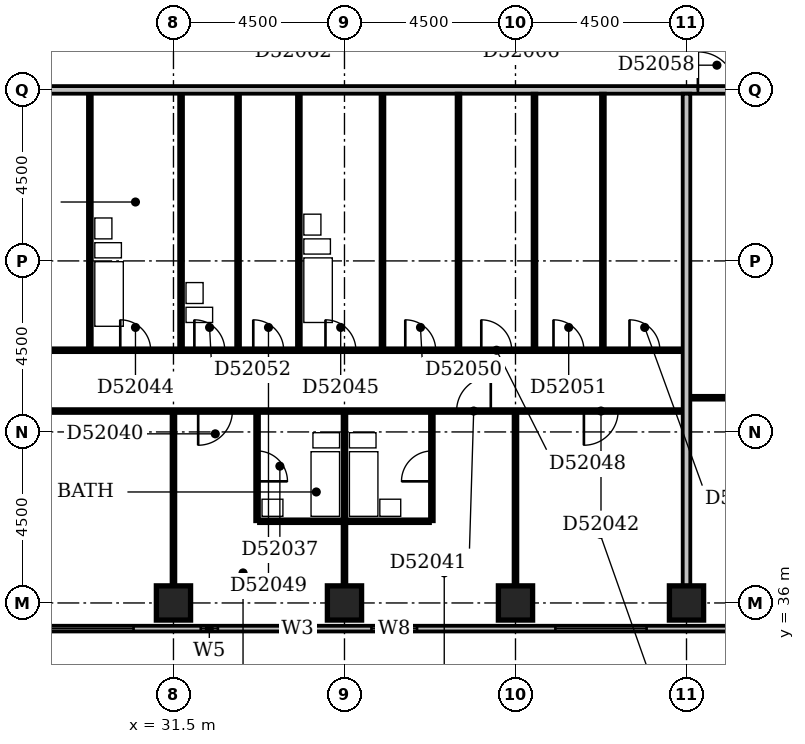
"""IFC4 building model, lengths in metres.
Left out: names, types, materials, properties, quantities, classifications, styles, units other than length and angle.
Written with IfcOpenShell. Run it as: python <this file> out.ifc"""

import sys

from ifc_helpers import new_model, si_unit, direction, frame, frame_2d, origin, origin_2d, place, context, subcontext, project, spatial, rectangle, extrude, element, fill, save


model = new_model("IFC4")
c1 = context("Model", 3, precision=1e-05, world=origin(), true_north=direction((0.0, 1.0)))
c2 = subcontext(c1, "Body", "Model", "MODEL_VIEW")
j1 = project(units=[si_unit("LENGTHUNIT", "METRE"), si_unit("PLANEANGLEUNIT", "RADIAN")], contexts=[c1])
p1 = place(None, origin())
s1 = spatial("IfcSite", under=j1, at=p1, CompositionType="ELEMENT")
p2 = place(p1, origin())
s2 = spatial("IfcBuilding", under=s1, at=p2, CompositionType="ELEMENT")
p3 = place(p2, frame((0.0, 0.0, 204.2)))
s3 = spatial("IfcBuildingStorey", under=s2, at=p3, CompositionType="ELEMENT", Elevation=204.2)
for number, where, z_axis, x_axis in (
    (1, (31.5, 36.0, -0.3), (0.0, 0.0, 1.0), (1.0, 0.0, 0.0)),
    (2, (36.0, 36.0, -0.3), (0.0, 0.0, 1.0), (1.0, 0.0, 0.0)),
    (3, (40.5, 36.0, -0.3), (0.0, 0.0, 1.0), (1.0, 0.0, 0.0)),
    (4, (45.0, 36.0, -0.3), (0.0, 0.0, 1.0), (1.0, 0.0, 0.0)),
):
    element("IfcColumn", number, at=place(p3, frame(where, z_axis=z_axis, x_axis=x_axis)), inside=s3, PredefinedType="COLUMN", context=c2, shape_type="SweptSolid", body=[
        extrude(rectangle(XDim=0.9, YDim=0.9, at=origin_2d()), origin(), (0.0, 0.0, 1.0), 3.6),
    ])
p4 = place(p3, frame((23.1, 35.325, 0.0), z_axis=(0.0, 0.0, 1.0), x_axis=(1.0, 0.0, 0.0)))
e5 = element("IfcWall", 5, at=p4, inside=s3, PredefinedType="STANDARD", context=c2, shape_type="SweptSolid", body=[
    extrude(rectangle(XDim=27.15, YDim=0.15, at=frame_2d((13.575, 0.0))), origin(), (0.0, 0.0, 1.0), 2.7),
])
p5 = place(p4, frame((0.45, 0.0, 0.6)))
e6 = element("IfcOpeningElement", 6, at=p5, cuts=e5, PredefinedType="OPENING", context=c2, shape_type="SweptSolid", body=[
    extrude(rectangle(XDim=2.4, YDim=1.8, at=frame_2d((1.2, 0.9))), frame((0.0, 0.087, 0.0), z_axis=(0.0, -1.0, 0.0), x_axis=(1.0, 0.0, 0.0)), (0.0, 0.0, 1.0), 0.174),
])
p6 = place(p4, frame((4.95, 0.0, 0.6)))
e7 = element("IfcOpeningElement", 7, at=p6, cuts=e5, PredefinedType="OPENING", context=c2, shape_type="SweptSolid", body=[
    extrude(rectangle(XDim=2.4, YDim=1.8, at=frame_2d((1.2, 0.9))), frame((0.0, 0.087, 0.0), z_axis=(0.0, -1.0, 0.0), x_axis=(1.0, 0.0, 0.0)), (0.0, 0.0, 1.0), 0.174),
])
p7 = place(p4, frame((9.118, 0.0, 0.6)))
e8 = element("IfcOpeningElement", 8, at=p7, cuts=e5, PredefinedType="OPENING", context=c2, shape_type="SweptSolid", body=[
    extrude(rectangle(XDim=0.45, YDim=1.8, at=frame_2d((0.225, 0.9))), frame((0.0, 0.087, 0.0), z_axis=(0.0, -1.0, 0.0), x_axis=(1.0, 0.0, 0.0)), (0.0, 0.0, 1.0), 0.174),
])
p8 = place(p4, frame((11.218, 0.0, 0.6)))
e9 = element("IfcOpeningElement", 9, at=p8, cuts=e5, PredefinedType="OPENING", context=c2, shape_type="SweptSolid", body=[
    extrude(rectangle(XDim=0.9, YDim=1.8, at=frame_2d((0.45, 0.9))), frame((0.0, 0.087, 0.0), z_axis=(0.0, -1.0, 0.0), x_axis=(1.0, 0.0, 0.0)), (0.0, 0.0, 1.0), 0.174),
])
p9 = place(p4, frame((13.61, 0.0, 0.6)))
e10 = element("IfcOpeningElement", 10, at=p9, cuts=e5, PredefinedType="OPENING", context=c2, shape_type="SweptSolid", body=[
    extrude(rectangle(XDim=1.2, YDim=1.8, at=frame_2d((0.6, 0.9))), frame((0.0, 0.087, 0.0), z_axis=(0.0, -1.0, 0.0), x_axis=(1.0, 0.0, 0.0)), (0.0, 0.0, 1.0), 0.174),
])
p10 = place(p4, frame((18.45, 0.0, 0.6)))
e11 = element("IfcOpeningElement", 11, at=p10, cuts=e5, PredefinedType="OPENING", context=c2, shape_type="SweptSolid", body=[
    extrude(rectangle(XDim=2.4, YDim=1.8, at=frame_2d((1.2, 0.9))), frame((0.0, 0.087, 0.0), z_axis=(0.0, -1.0, 0.0), x_axis=(1.0, 0.0, 0.0)), (0.0, 0.0, 1.0), 0.174),
])
p11 = place(p4, frame((22.95, 0.0, 0.6)))
e12 = element("IfcOpeningElement", 12, at=p11, cuts=e5, PredefinedType="OPENING", context=c2, shape_type="SweptSolid", body=[
    extrude(rectangle(XDim=2.4, YDim=1.8, at=frame_2d((1.2, 0.9))), frame((0.0, 0.087, 0.0), z_axis=(0.0, -1.0, 0.0), x_axis=(1.0, 0.0, 0.0)), (0.0, 0.0, 1.0), 0.174),
])
p12 = place(p3, frame((31.5, 36.45, 0.0), z_axis=(0.0, 0.0, 1.0), x_axis=(0.0, 1.0, 0.0)))
e13 = element("IfcWall", 13, at=p12, inside=s3, PredefinedType="PARTITIONING", context=c2, shape_type="SweptSolid", body=[
    extrude(rectangle(XDim=4.55, YDim=0.1, at=frame_2d((2.275, 0.0))), origin(), (0.0, 0.0, 1.0), 3.3),
])
p13 = place(p3, frame((36.0, 36.45, 0.0), z_axis=(0.0, 0.0, 1.0), x_axis=(0.0, 1.0, 0.0)))
e14 = element("IfcWall", 14, at=p13, inside=s3, PredefinedType="PARTITIONING", context=c2, shape_type="SweptSolid", body=[
    extrude(rectangle(XDim=4.55, YDim=0.1, at=frame_2d((2.275, 0.0))), origin(), (0.0, 0.0, 1.0), 2.4),
])
p14 = place(p3, frame((40.5, 36.45, 0.0), z_axis=(0.0, 0.0, 1.0), x_axis=(0.0, 1.0, 0.0)))
e15 = element("IfcWall", 15, at=p14, inside=s3, PredefinedType="PARTITIONING", context=c2, shape_type="SweptSolid", body=[
    extrude(rectangle(XDim=4.55, YDim=0.1, at=frame_2d((2.275, 0.0))), origin(), (0.0, 0.0, 1.0), 3.3),
])
p15 = place(p3, frame((45.0, 36.45, 0.0), z_axis=(0.0, 0.0, 1.0), x_axis=(0.0, 1.0, 0.0)))
e16 = element("IfcWall", 16, at=p15, inside=s3, PredefinedType="PARTITIONING", context=c2, shape_type="SweptSolid", body=[
    extrude(rectangle(XDim=12.95, YDim=0.2, at=frame_2d((6.475, 0.0))), origin(), (0.0, 0.0, 1.0), 2.6),
])
p16 = place(p3, frame((33.7, 38.15, 0.0), z_axis=(0.0, 0.0, 1.0), x_axis=(0.0, 1.0, 0.0)))
e17 = element("IfcWall", 17, at=p16, inside=s3, PredefinedType="PLUMBINGWALL", context=c2, shape_type="SweptSolid", body=[
    extrude(rectangle(XDim=2.85, YDim=0.1, at=frame_2d((1.425, 0.0))), origin(), (0.0, 0.0, 1.0), 3.3),
])
p17 = place(p16, frame((1.05, 0.0, 0.0)))
e18 = element("IfcOpeningElement", 18, at=p17, cuts=e17, PredefinedType="OPENING", context=c2, shape_type="SweptSolid", body=[
    extrude(rectangle(XDim=0.8, YDim=2.1, at=frame_2d((0.4, 1.05))), frame((0.0, 0.062, 0.0), z_axis=(0.0, -1.0, 0.0), x_axis=(1.0, 0.0, 0.0)), (0.0, 0.0, 1.0), 0.124),
])
p18 = place(p3, frame((33.75, 38.15, 0.0), z_axis=(0.0, 0.0, 1.0), x_axis=(1.0, 0.0, 0.0)))
e19 = element("IfcWall", 19, at=p18, inside=s3, PredefinedType="PLUMBINGWALL", context=c2, shape_type="SweptSolid", body=[
    extrude(rectangle(XDim=4.5, YDim=0.1, at=frame_2d((2.25, 0.0))), origin(), (0.0, 0.0, 1.0), 3.3),
])
p19 = place(p3, frame((38.3, 38.15, 0.0), z_axis=(0.0, 0.0, 1.0), x_axis=(0.0, 1.0, 0.0)))
e20 = element("IfcWall", 20, at=p19, inside=s3, PredefinedType="PLUMBINGWALL", context=c2, shape_type="SweptSolid", body=[
    extrude(rectangle(XDim=2.85, YDim=0.1, at=frame_2d((1.425, 0.0))), origin(), (0.0, 0.0, 1.0), 3.3),
])
p20 = place(p19, frame((1.05, 0.0, 0.0)))
e21 = element("IfcOpeningElement", 21, at=p20, cuts=e20, PredefinedType="OPENING", context=c2, shape_type="SweptSolid", body=[
    extrude(rectangle(XDim=0.8, YDim=2.1, at=frame_2d((0.4, 1.05))), frame((0.0, 0.062, 0.0), z_axis=(0.0, -1.0, 0.0), x_axis=(1.0, 0.0, 0.0)), (0.0, 0.0, 1.0), 0.124),
])
p21 = place(p3, frame((22.6, 41.05, 0.0), z_axis=(0.0, 0.0, 1.0), x_axis=(1.0, 0.0, 0.0)))
e22 = element("IfcWall", 22, at=p21, inside=s3, PredefinedType="PARTITIONING", context=c2, shape_type="SweptSolid", body=[
    extrude(rectangle(XDim=22.3, YDim=0.1, at=frame_2d((11.15, 0.0))), origin(), (0.0, 0.0, 1.0), 3.3),
])
p22 = place(p21, frame((3.9, 0.0, 0.0)))
e23 = element("IfcOpeningElement", 23, at=p22, cuts=e22, PredefinedType="OPENING", context=c2, shape_type="SweptSolid", body=[
    extrude(rectangle(XDim=0.9, YDim=2.1, at=frame_2d((0.45, 1.05))), frame((0.0, 0.062, 0.0), z_axis=(0.0, -1.0, 0.0), x_axis=(1.0, 0.0, 0.0)), (0.0, 0.0, 1.0), 0.124),
])
p23 = place(p21, frame((9.55, 0.0, 0.0)))
e24 = element("IfcOpeningElement", 24, at=p23, cuts=e22, PredefinedType="OPENING", context=c2, shape_type="SweptSolid", body=[
    extrude(rectangle(XDim=0.9, YDim=2.1, at=frame_2d((0.45, 1.05))), frame((0.0, 0.062, 0.0), z_axis=(0.0, -1.0, 0.0), x_axis=(1.0, 0.0, 0.0)), (0.0, 0.0, 1.0), 0.124),
])
p24 = place(p21, frame((16.35, 0.0, 0.0)))
e25 = element("IfcOpeningElement", 25, at=p24, cuts=e22, PredefinedType="OPENING", context=c2, shape_type="SweptSolid", body=[
    extrude(rectangle(XDim=0.9, YDim=2.1, at=frame_2d((0.45, 1.05))), frame((0.0, 0.062, 0.0), z_axis=(0.0, -1.0, 0.0), x_axis=(1.0, 0.0, 0.0)), (0.0, 0.0, 1.0), 0.124),
])
p25 = place(p21, frame((19.7, 0.0, 0.0)))
e26 = element("IfcOpeningElement", 26, at=p25, cuts=e22, PredefinedType="OPENING", context=c2, shape_type="SweptSolid", body=[
    extrude(rectangle(XDim=0.9, YDim=2.1, at=frame_2d((0.45, 1.05))), frame((0.0, 0.062, 0.0), z_axis=(0.0, -1.0, 0.0), x_axis=(1.0, 0.0, 0.0)), (0.0, 0.0, 1.0), 0.124),
])
p26 = place(p3, frame((45.1, 41.4, 0.0), z_axis=(0.0, 0.0, 1.0), x_axis=(1.0, 0.0, 0.0)))
e27 = element("IfcWall", 27, at=p26, inside=s3, PredefinedType="PARTITIONING", context=c2, shape_type="SweptSolid", body=[
    extrude(rectangle(XDim=9.5, YDim=0.1, at=frame_2d((4.75, 0.0))), origin(), (0.0, 0.0, 1.0), 3.3),
])
p27 = place(p26, frame((3.95, 0.0, 0.0)))
e28 = element("IfcOpeningElement", 28, at=p27, cuts=e27, PredefinedType="OPENING", context=c2, shape_type="SweptSolid", body=[
    extrude(rectangle(XDim=0.9, YDim=2.1, at=frame_2d((0.45, 1.05))), frame((0.0, 0.062, 0.0), z_axis=(0.0, -1.0, 0.0), x_axis=(1.0, 0.0, 0.0)), (0.0, 0.0, 1.0), 0.124),
])
p28 = place(p3, frame((24.15, 42.65, 0.0), z_axis=(0.0, 0.0, 1.0), x_axis=(1.0, 0.0, 0.0)))
e29 = element("IfcWall", 29, at=p28, inside=s3, PredefinedType="PARTITIONING", context=c2, shape_type="SweptSolid", body=[
    extrude(rectangle(XDim=20.75, YDim=0.1, at=frame_2d((10.375, 0.0))), origin(), (0.0, 0.0, 1.0), 3.3),
])
p29 = place(p28, frame((5.95, 0.0, 0.0)))
e30 = element("IfcOpeningElement", 30, at=p29, cuts=e29, PredefinedType="OPENING", context=c2, shape_type="SweptSolid", body=[
    extrude(rectangle(XDim=0.8, YDim=2.1, at=frame_2d((0.4, 1.05))), frame((0.0, 0.062, 0.0), z_axis=(0.0, -1.0, 0.0), x_axis=(1.0, 0.0, 0.0)), (0.0, 0.0, 1.0), 0.124),
])
p30 = place(p28, frame((11.35, 0.0, 0.0)))
e31 = element("IfcOpeningElement", 31, at=p30, cuts=e29, PredefinedType="OPENING", context=c2, shape_type="SweptSolid", body=[
    extrude(rectangle(XDim=0.8, YDim=2.1, at=frame_2d((0.4, 1.05))), frame((0.0, 0.062, 0.0), z_axis=(0.0, -1.0, 0.0), x_axis=(1.0, 0.0, 0.0)), (0.0, 0.0, 1.0), 0.124),
])
p31 = place(p28, frame((2.1, 0.0, 0.0)))
e32 = element("IfcOpeningElement", 32, at=p31, cuts=e29, PredefinedType="OPENING", context=c2, shape_type="SweptSolid", body=[
    extrude(rectangle(XDim=0.9, YDim=2.1, at=frame_2d((0.45, 1.05))), frame((0.0, 0.062, 0.0), z_axis=(0.0, -1.0, 0.0), x_axis=(1.0, 0.0, 0.0)), (0.0, 0.0, 1.0), 0.124),
])
p32 = place(p28, frame((19.35, 0.0, 0.0)))
e33 = element("IfcOpeningElement", 33, at=p32, cuts=e29, PredefinedType="OPENING", context=c2, shape_type="SweptSolid", body=[
    extrude(rectangle(XDim=0.8, YDim=2.1, at=frame_2d((0.4, 1.05))), frame((0.0, 0.062, 0.0), z_axis=(0.0, -1.0, 0.0), x_axis=(1.0, 0.0, 0.0)), (0.0, 0.0, 1.0), 0.124),
])
p33 = place(p28, frame((15.45, 0.0, 0.0)))
e34 = element("IfcOpeningElement", 34, at=p33, cuts=e29, PredefinedType="OPENING", context=c2, shape_type="SweptSolid", body=[
    extrude(rectangle(XDim=0.8, YDim=2.1, at=frame_2d((0.4, 1.05))), frame((0.0, 0.062, 0.0), z_axis=(0.0, -1.0, 0.0), x_axis=(1.0, 0.0, 0.0)), (0.0, 0.0, 1.0), 0.124),
])
p34 = place(p28, frame((9.45, 0.0, 0.0)))
e35 = element("IfcOpeningElement", 35, at=p34, cuts=e29, PredefinedType="OPENING", context=c2, shape_type="SweptSolid", body=[
    extrude(rectangle(XDim=0.8, YDim=2.1, at=frame_2d((0.4, 1.05))), frame((0.0, 0.062, 0.0), z_axis=(0.0, -1.0, 0.0), x_axis=(1.0, 0.0, 0.0)), (0.0, 0.0, 1.0), 0.124),
])
p35 = place(p28, frame((13.45, 0.0, 0.0)))
e36 = element("IfcOpeningElement", 36, at=p35, cuts=e29, PredefinedType="OPENING", context=c2, shape_type="SweptSolid", body=[
    extrude(rectangle(XDim=0.8, YDim=2.1, at=frame_2d((0.4, 1.05))), frame((0.0, 0.062, 0.0), z_axis=(0.0, -1.0, 0.0), x_axis=(1.0, 0.0, 0.0)), (0.0, 0.0, 1.0), 0.124),
])
p36 = place(p28, frame((17.35, 0.0, 0.0)))
e37 = element("IfcOpeningElement", 37, at=p36, cuts=e29, PredefinedType="OPENING", context=c2, shape_type="SweptSolid", body=[
    extrude(rectangle(XDim=0.8, YDim=2.1, at=frame_2d((0.4, 1.05))), frame((0.0, 0.062, 0.0), z_axis=(0.0, -1.0, 0.0), x_axis=(1.0, 0.0, 0.0)), (0.0, 0.0, 1.0), 0.124),
])
p37 = place(p28, frame((7.9, 0.0, 0.0)))
e38 = element("IfcOpeningElement", 38, at=p37, cuts=e29, PredefinedType="OPENING", context=c2, shape_type="SweptSolid", body=[
    extrude(rectangle(XDim=0.8, YDim=2.1, at=frame_2d((0.4, 1.05))), frame((0.0, 0.062, 0.0), z_axis=(0.0, -1.0, 0.0), x_axis=(1.0, 0.0, 0.0)), (0.0, 0.0, 1.0), 0.124),
])
for number, where, z_axis, x_axis in (
    (39, (29.3, 42.7, 0.0), (0.0, 0.0, 1.0), (0.0, 1.0, 0.0)),
    (40, (31.7, 42.7, 0.0), (0.0, 0.0, 1.0), (0.0, 1.0, 0.0)),
    (41, (33.2, 42.7, 0.0), (0.0, 0.0, 1.0), (0.0, 1.0, 0.0)),
    (42, (34.8, 42.7, 0.0), (0.0, 0.0, 1.0), (0.0, 1.0, 0.0)),
    (43, (37.0, 42.7, 0.0), (0.0, 0.0, 1.0), (0.0, 1.0, 0.0)),
):
    element("IfcWall", number, at=place(p3, frame(where, z_axis=z_axis, x_axis=x_axis)), inside=s3, PredefinedType="PLUMBINGWALL", context=c2, shape_type="SweptSolid", body=[
        extrude(rectangle(XDim=6.7, YDim=0.1, at=frame_2d((3.35, 0.0))), origin(), (0.0, 0.0, 1.0), 3.3),
    ])
for number, where, z_axis, x_axis in (
    (44, (39.0, 42.7, 0.0), (0.0, 0.0, 1.0), (0.0, 1.0, 0.0)),
    (45, (41.0, 42.7, 0.0), (0.0, 0.0, 1.0), (0.0, 1.0, 0.0)),
    (46, (42.8, 42.7, 0.0), (0.0, 0.0, 1.0), (0.0, 1.0, 0.0)),
):
    element("IfcWall", number, at=place(p3, frame(where, z_axis=z_axis, x_axis=x_axis)), inside=s3, PredefinedType="PARTITIONING", context=c2, shape_type="SweptSolid", body=[
        extrude(rectangle(XDim=6.7, YDim=0.1, at=frame_2d((3.35, 0.0))), origin(), (0.0, 0.0, 1.0), 3.3),
    ])
p38 = place(p3, frame((22.6, 49.5, 0.0), z_axis=(0.0, 0.0, 1.0), x_axis=(1.0, 0.0, 0.0)))
e47 = element("IfcWall", 47, at=p38, inside=s3, PredefinedType="PARTITIONING", context=c2, shape_type="SweptSolid", body=[
    extrude(rectangle(XDim=30.95, YDim=0.2, at=frame_2d((15.475, 0.0))), origin(), (0.0, 0.0, 1.0), 3.3),
])
p39 = place(p38, frame((0.2, 0.0, 0.0)))
e48 = element("IfcOpeningElement", 48, at=p39, cuts=e47, PredefinedType="OPENING", context=c2, shape_type="SweptSolid", body=[
    extrude(rectangle(XDim=1.0, YDim=2.1, at=frame_2d((0.5, 1.05))), frame((0.0, 0.112, 0.0), z_axis=(0.0, -1.0, 0.0), x_axis=(1.0, 0.0, 0.0)), (0.0, 0.0, 1.0), 0.224),
])
p40 = place(p38, frame((22.7, 0.0, 0.0)))
e49 = element("IfcOpeningElement", 49, at=p40, cuts=e47, PredefinedType="OPENING", context=c2, shape_type="SweptSolid", body=[
    extrude(rectangle(XDim=1.0, YDim=2.1, at=frame_2d((0.5, 1.05))), frame((0.0, 0.112, 0.0), z_axis=(0.0, -1.0, 0.0), x_axis=(1.0, 0.0, 0.0)), (0.0, 0.0, 1.0), 0.224),
])
p41 = place(p6, origin())
e50 = element("IfcWindow", 50, at=p41, inside=s3, PartitioningType="SINGLE_PANEL", PredefinedType="WINDOW", context=c2, shape_type="SweptSolid", body=[
    extrude(rectangle(XDim=2.4, YDim=1.8, at=frame_2d((1.2, 0.9))), frame((0.0, 0.03, 0.0), z_axis=(0.0, -1.0, 0.0), x_axis=(1.0, 0.0, 0.0)), (0.0, 0.0, 1.0), 0.06),
])
fill(e7, e50)
p42 = place(p7, origin())
e51 = element("IfcWindow", 51, at=p42, inside=s3, PartitioningType="SINGLE_PANEL", PredefinedType="WINDOW", context=c2, shape_type="SweptSolid", body=[
    extrude(rectangle(XDim=0.45, YDim=1.8, at=frame_2d((0.225, 0.9))), frame((0.0, 0.03, 0.0), z_axis=(0.0, -1.0, 0.0), x_axis=(1.0, 0.0, 0.0)), (0.0, 0.0, 1.0), 0.06),
])
fill(e8, e51)
p43 = place(p8, origin())
e52 = element("IfcWindow", 52, at=p43, inside=s3, PartitioningType="SINGLE_PANEL", PredefinedType="WINDOW", context=c2, shape_type="SweptSolid", body=[
    extrude(rectangle(XDim=0.9, YDim=1.8, at=frame_2d((0.45, 0.9))), frame((0.0, 0.03, 0.0), z_axis=(0.0, -1.0, 0.0), x_axis=(1.0, 0.0, 0.0)), (0.0, 0.0, 1.0), 0.06),
])
fill(e9, e52)
p44 = place(p9, origin())
e53 = element("IfcWindow", 53, at=p44, inside=s3, PartitioningType="SINGLE_PANEL", PredefinedType="WINDOW", context=c2, shape_type="SweptSolid", body=[
    extrude(rectangle(XDim=1.2, YDim=1.8, at=frame_2d((0.6, 0.9))), frame((0.0, 0.03, 0.0), z_axis=(0.0, -1.0, 0.0), x_axis=(1.0, 0.0, 0.0)), (0.0, 0.0, 1.0), 0.06),
])
fill(e10, e53)
p45 = place(p10, origin())
e54 = element("IfcWindow", 54, at=p45, inside=s3, PartitioningType="SINGLE_PANEL", PredefinedType="WINDOW", context=c2, shape_type="SweptSolid", body=[
    extrude(rectangle(XDim=2.4, YDim=1.8, at=frame_2d((1.2, 0.9))), frame((0.0, 0.03, 0.0), z_axis=(0.0, -1.0, 0.0), x_axis=(1.0, 0.0, 0.0)), (0.0, 0.0, 1.0), 0.06),
])
fill(e11, e54)
p46 = place(p17, frame((0.8, 0.0, 0.0), z_axis=(0.0, 0.0, 1.0), x_axis=(-1.0, 0.0, 0.0)))
e55 = element("IfcDoor", 55, at=p46, inside=s3, OperationType="SINGLE_SWING_RIGHT", PredefinedType="DOOR", context=c2, shape_type="SweptSolid", body=[
    extrude(rectangle(XDim=0.8, YDim=2.1, at=frame_2d((0.4, 1.05))), frame((0.0, 0.025, 0.0), z_axis=(0.0, -1.0, 0.0), x_axis=(1.0, 0.0, 0.0)), (0.0, 0.0, 1.0), 0.05),
])
fill(e18, e55)
p47 = place(p20, origin())
e56 = element("IfcDoor", 56, at=p47, inside=s3, OperationType="SINGLE_SWING_LEFT", PredefinedType="DOOR", context=c2, shape_type="SweptSolid", body=[
    extrude(rectangle(XDim=0.8, YDim=2.1, at=frame_2d((0.4, 1.05))), frame((0.0, 0.025, 0.0), z_axis=(0.0, -1.0, 0.0), x_axis=(1.0, 0.0, 0.0)), (0.0, 0.0, 1.0), 0.05),
])
fill(e21, e56)
p48 = place(p23, frame((0.9, 0.0, 0.0), z_axis=(0.0, 0.0, 1.0), x_axis=(-1.0, 0.0, 0.0)))
e57 = element("IfcDoor", 57, at=p48, inside=s3, OperationType="SINGLE_SWING_RIGHT", PredefinedType="DOOR", context=c2, shape_type="SweptSolid", body=[
    extrude(rectangle(XDim=0.9, YDim=2.1, at=frame_2d((0.45, 1.05))), frame((0.0, 0.025, 0.0), z_axis=(0.0, -1.0, 0.0), x_axis=(1.0, 0.0, 0.0)), (0.0, 0.0, 1.0), 0.05),
])
fill(e24, e57)
p49 = place(p24, frame((0.9, 0.0, 0.0), z_axis=(0.0, 0.0, 1.0), x_axis=(-1.0, 0.0, 0.0)))
e58 = element("IfcDoor", 58, at=p49, inside=s3, OperationType="SINGLE_SWING_LEFT", PredefinedType="DOOR", context=c2, shape_type="SweptSolid", body=[
    extrude(rectangle(XDim=0.9, YDim=2.1, at=frame_2d((0.45, 1.05))), frame((0.0, 0.025, 0.0), z_axis=(0.0, -1.0, 0.0), x_axis=(1.0, 0.0, 0.0)), (0.0, 0.0, 1.0), 0.05),
])
fill(e25, e58)
p50 = place(p25, frame((0.9, 0.0, 0.0), z_axis=(0.0, 0.0, 1.0), x_axis=(-1.0, 0.0, 0.0)))
e59 = element("IfcDoor", 59, at=p50, inside=s3, OperationType="SINGLE_SWING_RIGHT", PredefinedType="DOOR", context=c2, shape_type="SweptSolid", body=[
    extrude(rectangle(XDim=0.9, YDim=2.1, at=frame_2d((0.45, 1.05))), frame((0.0, 0.025, 0.0), z_axis=(0.0, -1.0, 0.0), x_axis=(1.0, 0.0, 0.0)), (0.0, 0.0, 1.0), 0.05),
])
fill(e26, e59)
p51 = place(p29, origin())
e60 = element("IfcDoor", 60, at=p51, inside=s3, OperationType="SINGLE_SWING_LEFT", PredefinedType="DOOR", context=c2, shape_type="SweptSolid", body=[
    extrude(rectangle(XDim=0.8, YDim=2.1, at=frame_2d((0.4, 1.05))), frame((0.0, 0.025, 0.0), z_axis=(0.0, -1.0, 0.0), x_axis=(1.0, 0.0, 0.0)), (0.0, 0.0, 1.0), 0.05),
])
fill(e30, e60)
p52 = place(p30, origin())
e61 = element("IfcDoor", 61, at=p52, inside=s3, OperationType="SINGLE_SWING_LEFT", PredefinedType="DOOR", context=c2, shape_type="SweptSolid", body=[
    extrude(rectangle(XDim=0.8, YDim=2.1, at=frame_2d((0.4, 1.05))), frame((0.0, 0.025, 0.0), z_axis=(0.0, -1.0, 0.0), x_axis=(1.0, 0.0, 0.0)), (0.0, 0.0, 1.0), 0.05),
])
fill(e31, e61)
p53 = place(p32, origin())
e62 = element("IfcDoor", 62, at=p53, inside=s3, OperationType="SINGLE_SWING_LEFT", PredefinedType="DOOR", context=c2, shape_type="SweptSolid", body=[
    extrude(rectangle(XDim=0.8, YDim=2.1, at=frame_2d((0.4, 1.05))), frame((0.0, 0.025, 0.0), z_axis=(0.0, -1.0, 0.0), x_axis=(1.0, 0.0, 0.0)), (0.0, 0.0, 1.0), 0.05),
])
fill(e33, e62)
p54 = place(p33, origin())
e63 = element("IfcDoor", 63, at=p54, inside=s3, OperationType="SINGLE_SWING_LEFT", PredefinedType="DOOR", context=c2, shape_type="SweptSolid", body=[
    extrude(rectangle(XDim=0.8, YDim=2.1, at=frame_2d((0.4, 1.05))), frame((0.0, 0.025, 0.0), z_axis=(0.0, -1.0, 0.0), x_axis=(1.0, 0.0, 0.0)), (0.0, 0.0, 1.0), 0.05),
])
fill(e34, e63)
p55 = place(p34, origin())
e64 = element("IfcDoor", 64, at=p55, inside=s3, OperationType="SINGLE_SWING_LEFT", PredefinedType="DOOR", context=c2, shape_type="SweptSolid", body=[
    extrude(rectangle(XDim=0.8, YDim=2.1, at=frame_2d((0.4, 1.05))), frame((0.0, 0.025, 0.0), z_axis=(0.0, -1.0, 0.0), x_axis=(1.0, 0.0, 0.0)), (0.0, 0.0, 1.0), 0.05),
])
fill(e35, e64)
p56 = place(p35, origin())
e65 = element("IfcDoor", 65, at=p56, inside=s3, OperationType="SINGLE_SWING_LEFT", PredefinedType="DOOR", context=c2, shape_type="SweptSolid", body=[
    extrude(rectangle(XDim=0.8, YDim=2.1, at=frame_2d((0.4, 1.05))), frame((0.0, 0.025, 0.0), z_axis=(0.0, -1.0, 0.0), x_axis=(1.0, 0.0, 0.0)), (0.0, 0.0, 1.0), 0.05),
])
fill(e36, e65)
p57 = place(p36, origin())
e66 = element("IfcDoor", 66, at=p57, inside=s3, OperationType="SINGLE_SWING_LEFT", PredefinedType="DOOR", context=c2, shape_type="SweptSolid", body=[
    extrude(rectangle(XDim=0.8, YDim=2.1, at=frame_2d((0.4, 1.05))), frame((0.0, 0.025, 0.0), z_axis=(0.0, -1.0, 0.0), x_axis=(1.0, 0.0, 0.0)), (0.0, 0.0, 1.0), 0.05),
])
fill(e37, e66)
p58 = place(p37, origin())
e67 = element("IfcDoor", 67, at=p58, inside=s3, OperationType="SINGLE_SWING_LEFT", PredefinedType="DOOR", context=c2, shape_type="SweptSolid", body=[
    extrude(rectangle(XDim=0.8, YDim=2.1, at=frame_2d((0.4, 1.05))), frame((0.0, 0.025, 0.0), z_axis=(0.0, -1.0, 0.0), x_axis=(1.0, 0.0, 0.0)), (0.0, 0.0, 1.0), 0.05),
])
fill(e38, e67)
p59 = place(p40, origin())
e68 = element("IfcDoor", 68, at=p59, inside=s3, OperationType="SINGLE_SWING_LEFT", PredefinedType="DOOR", context=c2, shape_type="SweptSolid", body=[
    extrude(rectangle(XDim=1.0, YDim=2.1, at=frame_2d((0.5, 1.05))), frame((0.0, 0.025, 0.0), z_axis=(0.0, -1.0, 0.0), x_axis=(1.0, 0.0, 0.0)), (0.0, 0.0, 1.0), 0.05),
])
fill(e49, e68)
save(model, sys.argv[1])
